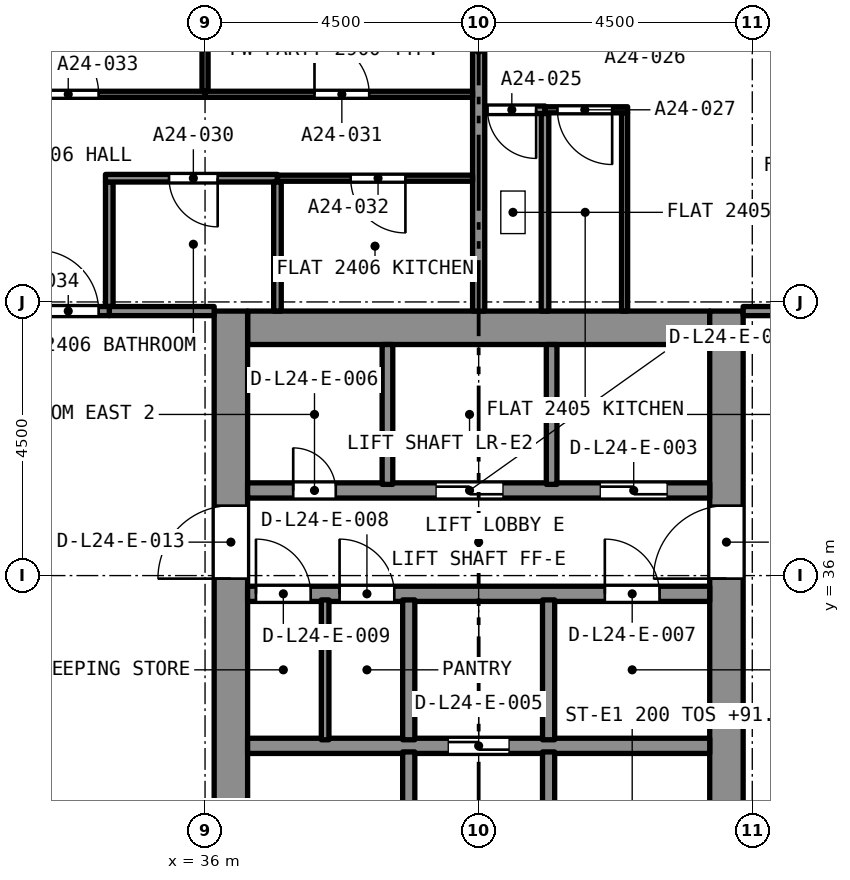
"""IFC4 building model, lengths in metres.
Left out: names, types, materials, properties, quantities, classifications, styles, units other than length and angle.
Written with IfcOpenShell. Run it as: python <this file> out.ifc"""

import sys

from ifc_helpers import new_model, si_unit, direction, frame, frame_2d, origin, place, context, subcontext, project, spatial, rectangle, extrude, element, fill, save


model = new_model("IFC4")
c1 = context("Model", 3, precision=1e-05, world=origin(), true_north=direction((0.0, 1.0)))
c2 = subcontext(c1, "Body", "Model", "MODEL_VIEW")
j1 = project(units=[si_unit("LENGTHUNIT", "METRE"), si_unit("PLANEANGLEUNIT", "RADIAN")], contexts=[c1])
p1 = place(None, origin())
s1 = spatial("IfcSite", under=j1, at=p1, CompositionType="ELEMENT")
p2 = place(p1, origin())
s2 = spatial("IfcBuilding", under=s1, at=p2, CompositionType="ELEMENT")
p3 = place(p2, frame((0.0, 0.0, 89.6)))
s3 = spatial("IfcBuildingStorey", under=s2, at=p3, CompositionType="ELEMENT", Elevation=89.6)
p4 = place(p3, frame((36.7, 40.075, 0.0), z_axis=(0.0, 0.0, 1.0), x_axis=(1.0, 0.0, 0.0)))
e1 = element("IfcWall", 1, at=p4, inside=s3, PredefinedType="SOLIDWALL", context=c2, shape_type="SweptSolid", body=[
    extrude(rectangle(XDim=7.6, YDim=0.55, at=frame_2d((3.8, 0.0))), origin(), (0.0, 0.0, 1.0), 3.2),
])
p5 = place(p3, frame((36.425, 27.15, 0.0), z_axis=(0.0, 0.0, 1.0), x_axis=(0.0, 1.0, 0.0)))
e2 = element("IfcWall", 2, at=p5, inside=s3, PredefinedType="SOLIDWALL", context=c2, shape_type="SweptSolid", body=[
    extrude(rectangle(XDim=13.2, YDim=0.55, at=frame_2d((6.6, 0.0))), origin(), (0.0, 0.0, 1.0), 3.2),
])
p6 = place(p5, frame((8.8, 0.0, 0.0)))
e3 = element("IfcOpeningElement", 3, at=p6, cuts=e2, PredefinedType="OPENING", context=c2, shape_type="SweptSolid", body=[
    extrude(rectangle(XDim=1.2, YDim=2.1, at=frame_2d((0.6, 1.05))), frame((0.0, 0.285, 0.0), z_axis=(0.0, -1.0, 0.0), x_axis=(1.0, 0.0, 0.0)), (0.0, 0.0, 1.0), 0.57),
])
p7 = place(p3, frame((44.575, 27.15, 0.0), z_axis=(0.0, 0.0, 1.0), x_axis=(0.0, 1.0, 0.0)))
e4 = element("IfcWall", 4, at=p7, inside=s3, PredefinedType="SOLIDWALL", context=c2, shape_type="SweptSolid", body=[
    extrude(rectangle(XDim=13.2, YDim=0.55, at=frame_2d((6.6, 0.0))), origin(), (0.0, 0.0, 1.0), 3.2),
])
p8 = place(p7, frame((8.8, 0.0, 0.0)))
e5 = element("IfcOpeningElement", 5, at=p8, cuts=e4, PredefinedType="OPENING", context=c2, shape_type="SweptSolid", body=[
    extrude(rectangle(XDim=1.2, YDim=2.1, at=frame_2d((0.6, 1.05))), frame((0.0, 0.285, 0.0), z_axis=(0.0, -1.0, 0.0), x_axis=(1.0, 0.0, 0.0)), (0.0, 0.0, 1.0), 0.57),
])
p9 = place(p3, frame((41.591, 43.66, 0.0), z_axis=(0.0, 0.0, 1.0), x_axis=(-1.0, 0.0, 0.0)))
e6 = element("IfcWall", 6, at=p9, inside=s3, PredefinedType="PARTITIONING", context=c2, shape_type="SweptSolid", body=[
    extrude(rectangle(XDim=0.991, YDim=0.125, at=frame_2d((0.495, 0.0))), origin(), (0.0, 0.0, 1.0), 2.9),
])
p10 = place(p9, frame((0.146, 0.0, 0.0)))
e7 = element("IfcOpeningElement", 7, at=p10, cuts=e6, PredefinedType="OPENING", context=c2, shape_type="SweptSolid", body=[
    extrude(rectangle(XDim=0.8, YDim=2.1, at=frame_2d((0.4, 1.05))), frame((0.0, 0.073, 0.0), z_axis=(0.0, -1.0, 0.0), x_axis=(1.0, 0.0, 0.0)), (0.0, 0.0, 1.0), 0.145),
])
p11 = place(p3, frame((41.591, 40.35, 0.0), z_axis=(0.0, 0.0, 1.0), x_axis=(0.0, 1.0, 0.0)))
e8 = element("IfcWall", 8, at=p11, inside=s3, PredefinedType="PARTITIONING", context=c2, shape_type="SweptSolid", body=[
    extrude(rectangle(XDim=3.247, YDim=0.125, at=frame_2d((1.624, 0.0))), origin(), (0.0, 0.0, 1.0), 2.9),
])
p12 = place(p3, frame((40.5, 40.35, 0.0), z_axis=(0.0, 0.0, 1.0), x_axis=(0.0, 1.0, 0.0)))
e9 = element("IfcWall", 9, at=p12, inside=s3, PredefinedType="PARTITIONING", context=c2, shape_type="SweptSolid", body=[
    extrude(rectangle(XDim=8.575, YDim=0.2, at=frame_2d((4.288, 0.0))), origin(), (0.0, 0.0, 1.0), 2.9),
])
p13 = place(p3, frame((42.9, 40.35, 0.0), z_axis=(0.0, 0.0, 1.0), x_axis=(0.0, 1.0, 0.0)))
e10 = element("IfcWall", 10, at=p13, inside=s3, PredefinedType="PARTITIONING", context=c2, shape_type="SweptSolid", body=[
    extrude(rectangle(XDim=3.26, YDim=0.1, at=frame_2d((1.63, 0.0))), origin(), (0.0, 0.0, 1.0), 2.9),
])
p14 = place(p3, frame((42.95, 43.66, 0.0), z_axis=(0.0, 0.0, 1.0), x_axis=(-1.0, 0.0, 0.0)))
e11 = element("IfcWall", 11, at=p14, inside=s3, PredefinedType="PARTITIONING", context=c2, shape_type="SweptSolid", body=[
    extrude(rectangle(XDim=1.359, YDim=0.1, at=frame_2d((0.68, 0.0))), origin(), (0.0, 0.0, 1.0), 2.9),
])
p15 = place(p14, frame((0.254, 0.0, 0.0)))
e12 = element("IfcOpeningElement", 12, at=p15, cuts=e11, PredefinedType="OPENING", context=c2, shape_type="SweptSolid", body=[
    extrude(rectangle(XDim=0.9, YDim=2.1, at=frame_2d((0.45, 1.05))), frame((0.0, 0.06, 0.0), z_axis=(0.0, -1.0, 0.0), x_axis=(1.0, 0.0, 0.0)), (0.0, 0.0, 1.0), 0.12),
])
p16 = place(p3, frame((44.85, 40.35, 0.0), z_axis=(0.0, 0.0, 1.0), x_axis=(1.0, 0.0, 0.0)))
e13 = element("IfcWall", 13, at=p16, inside=s3, PredefinedType="PARTITIONING", context=c2, shape_type="SweptSolid", body=[
    extrude(rectangle(XDim=4.075, YDim=0.15, at=frame_2d((2.038, 0.0))), origin(), (0.0, 0.0, 1.0), 2.9),
])
p17 = place(p16, frame((1.9, 0.0, 0.0)))
e14 = element("IfcOpeningElement", 14, at=p17, cuts=e13, PredefinedType="OPENING", context=c2, shape_type="SweptSolid", body=[
    extrude(rectangle(XDim=1.0, YDim=2.1, at=frame_2d((0.5, 1.05))), frame((0.0, 0.085, 0.0), z_axis=(0.0, -1.0, 0.0), x_axis=(1.0, 0.0, 0.0)), (0.0, 0.0, 1.0), 0.17),
])
p18 = place(p3, frame((34.425, 40.425, 0.0), z_axis=(0.0, 0.0, 1.0), x_axis=(0.0, 1.0, 0.0)))
e15 = element("IfcWall", 15, at=p18, inside=s3, PredefinedType="PARTITIONING", context=c2, shape_type="SweptSolid", body=[
    extrude(rectangle(XDim=2.047, YDim=0.125, at=frame_2d((1.024, 0.0))), origin(), (0.0, 0.0, 1.0), 2.9),
])
p19 = place(p3, frame((37.19, 42.535, 0.0), z_axis=(0.0, 0.0, 1.0), x_axis=(-1.0, 0.0, 0.0)))
e16 = element("IfcWall", 16, at=p19, inside=s3, PredefinedType="PARTITIONING", context=c2, shape_type="SweptSolid", body=[
    extrude(rectangle(XDim=2.828, YDim=0.125, at=frame_2d((1.414, 0.0))), origin(), (0.0, 0.0, 1.0), 2.9),
])
p20 = place(p19, frame((0.983, 0.0, 0.0)))
e17 = element("IfcOpeningElement", 17, at=p20, cuts=e16, PredefinedType="OPENING", context=c2, shape_type="SweptSolid", body=[
    extrude(rectangle(XDim=0.8, YDim=2.1, at=frame_2d((0.4, 1.05))), frame((0.0, 0.073, 0.0), z_axis=(0.0, -1.0, 0.0), x_axis=(1.0, 0.0, 0.0)), (0.0, 0.0, 1.0), 0.145),
])
p21 = place(p3, frame((37.191, 40.35, 0.0), z_axis=(0.0, 0.0, 1.0), x_axis=(0.0, 1.0, 0.0)))
e18 = element("IfcWall", 18, at=p21, inside=s3, PredefinedType="PARTITIONING", context=c2, shape_type="SweptSolid", body=[
    extrude(rectangle(XDim=2.122, YDim=0.125, at=frame_2d((1.061, 0.0))), origin(), (0.0, 0.0, 1.0), 2.9),
])
p22 = place(p3, frame((34.425, 40.35, 0.0), z_axis=(0.0, 0.0, 1.0), x_axis=(1.0, 0.0, 0.0)))
e19 = element("IfcWall", 19, at=p22, inside=s3, PredefinedType="PARTITIONING", context=c2, shape_type="SweptSolid", body=[
    extrude(rectangle(XDim=1.725, YDim=0.15, at=frame_2d((0.862, 0.0))), origin(), (0.0, 0.0, 1.0), 2.9),
])
p23 = place(p3, frame((36.0, 43.915, 0.0), z_axis=(0.0, 0.0, 1.0), x_axis=(1.0, 0.0, 0.0)))
e20 = element("IfcWall", 20, at=p23, inside=s3, PredefinedType="PARTITIONING", context=c2, shape_type="SweptSolid", body=[
    extrude(rectangle(XDim=4.4, YDim=0.1, at=frame_2d((2.2, 0.0))), origin(), (0.0, 0.0, 1.0), 2.9),
])
p24 = place(p23, frame((1.8, 0.0, 0.0)))
e21 = element("IfcOpeningElement", 21, at=p24, cuts=e20, PredefinedType="OPENING", context=c2, shape_type="SweptSolid", body=[
    extrude(rectangle(XDim=0.9, YDim=2.1, at=frame_2d((0.45, 1.05))), frame((0.0, 0.06, 0.0), z_axis=(0.0, -1.0, 0.0), x_axis=(1.0, 0.0, 0.0)), (0.0, 0.0, 1.0), 0.12),
])
p25 = place(p3, frame((36.0, 43.965, 0.0), z_axis=(0.0, 0.0, 1.0), x_axis=(0.0, 1.0, 0.0)))
e22 = element("IfcWall", 22, at=p25, inside=s3, PredefinedType="PARTITIONING", context=c2, shape_type="SweptSolid", body=[
    extrude(rectangle(XDim=4.96, YDim=0.1, at=frame_2d((2.48, 0.0))), origin(), (0.0, 0.0, 1.0), 2.9),
])
p26 = place(p3, frame((40.4, 42.535, 0.0), z_axis=(0.0, 0.0, 1.0), x_axis=(-1.0, 0.0, 0.0)))
e23 = element("IfcWall", 23, at=p26, inside=s3, PredefinedType="PARTITIONING", context=c2, shape_type="SweptSolid", body=[
    extrude(rectangle(XDim=3.209, YDim=0.1, at=frame_2d((1.605, 0.0))), origin(), (0.0, 0.0, 1.0), 2.9),
])
p27 = place(p26, frame((1.105, 0.0, 0.0)))
e24 = element("IfcOpeningElement", 24, at=p27, cuts=e23, PredefinedType="OPENING", context=c2, shape_type="SweptSolid", body=[
    extrude(rectangle(XDim=0.9, YDim=2.1, at=frame_2d((0.45, 1.05))), frame((0.0, 0.06, 0.0), z_axis=(0.0, -1.0, 0.0), x_axis=(1.0, 0.0, 0.0)), (0.0, 0.0, 1.0), 0.12),
])
p28 = place(p3, frame((31.6, 43.915, 0.0), z_axis=(0.0, 0.0, 1.0), x_axis=(1.0, 0.0, 0.0)))
e25 = element("IfcWall", 25, at=p28, inside=s3, PredefinedType="PARTITIONING", context=c2, shape_type="SweptSolid", body=[
    extrude(rectangle(XDim=4.4, YDim=0.1, at=frame_2d((2.2, 0.0))), origin(), (0.0, 0.0, 1.0), 2.9),
])
p29 = place(p28, frame((1.65, 0.0, 0.0)))
e26 = element("IfcOpeningElement", 26, at=p29, cuts=e25, PredefinedType="OPENING", context=c2, shape_type="SweptSolid", body=[
    extrude(rectangle(XDim=1.0, YDim=2.1, at=frame_2d((0.5, 1.05))), frame((0.0, 0.06, 0.0), z_axis=(0.0, -1.0, 0.0), x_axis=(1.0, 0.0, 0.0)), (0.0, 0.0, 1.0), 0.12),
])
p30 = place(p3, frame((32.075, 40.35, 0.0), z_axis=(0.0, 0.0, 1.0), x_axis=(1.0, 0.0, 0.0)))
e27 = element("IfcWall", 27, at=p30, inside=s3, PredefinedType="PARTITIONING", context=c2, shape_type="SweptSolid", body=[
    extrude(rectangle(XDim=2.35, YDim=0.15, at=frame_2d((1.175, 0.0))), origin(), (0.0, 0.0, 1.0), 2.9),
])
p31 = place(p30, frame((1.175, 0.0, 0.0)))
e28 = element("IfcOpeningElement", 28, at=p31, cuts=e27, PredefinedType="OPENING", context=c2, shape_type="SweptSolid", body=[
    extrude(rectangle(XDim=1.0, YDim=2.1, at=frame_2d((0.5, 1.05))), frame((0.0, 0.085, 0.0), z_axis=(0.0, -1.0, 0.0), x_axis=(1.0, 0.0, 0.0)), (0.0, 0.0, 1.0), 0.17),
])
p32 = place(p3, frame((36.7, 33.2, 0.0), z_axis=(0.0, 0.0, 1.0), x_axis=(1.0, 0.0, 0.0)))
e29 = element("IfcWall", 29, at=p32, inside=s3, PredefinedType="SOLIDWALL", context=c2, shape_type="SweptSolid", body=[
    extrude(rectangle(XDim=7.6, YDim=0.25, at=frame_2d((3.8, 0.0))), origin(), (0.0, 0.0, 1.0), 2.9),
])
p33 = place(p32, frame((3.3, 0.0, 0.0)))
e30 = element("IfcOpeningElement", 30, at=p33, cuts=e29, PredefinedType="OPENING", context=c2, shape_type="SweptSolid", body=[
    extrude(rectangle(XDim=1.0, YDim=2.1, at=frame_2d((0.5, 1.05))), frame((0.0, 0.135, 0.0), z_axis=(0.0, -1.0, 0.0), x_axis=(1.0, 0.0, 0.0)), (0.0, 0.0, 1.0), 0.27),
])
p34 = place(p3, frame((36.7, 35.7, 0.0), z_axis=(0.0, 0.0, 1.0), x_axis=(1.0, 0.0, 0.0)))
e31 = element("IfcWall", 31, at=p34, inside=s3, PredefinedType="SOLIDWALL", context=c2, shape_type="SweptSolid", body=[
    extrude(rectangle(XDim=7.6, YDim=0.25, at=frame_2d((3.8, 0.0))), origin(), (0.0, 0.0, 1.0), 2.9),
])
p35 = place(p34, frame((5.875, 0.0, 0.0)))
e32 = element("IfcOpeningElement", 32, at=p35, cuts=e31, PredefinedType="OPENING", context=c2, shape_type="SweptSolid", body=[
    extrude(rectangle(XDim=0.9, YDim=2.1, at=frame_2d((0.45, 1.05))), frame((0.0, 0.135, 0.0), z_axis=(0.0, -1.0, 0.0), x_axis=(1.0, 0.0, 0.0)), (0.0, 0.0, 1.0), 0.27),
])
p36 = place(p34, frame((1.512, 0.0, 0.0)))
e33 = element("IfcOpeningElement", 33, at=p36, cuts=e31, PredefinedType="OPENING", context=c2, shape_type="SweptSolid", body=[
    extrude(rectangle(XDim=0.9, YDim=2.1, at=frame_2d((0.45, 1.05))), frame((0.0, 0.135, 0.0), z_axis=(0.0, -1.0, 0.0), x_axis=(1.0, 0.0, 0.0)), (0.0, 0.0, 1.0), 0.27),
])
p37 = place(p34, frame((0.137, 0.0, 0.0)))
e34 = element("IfcOpeningElement", 34, at=p37, cuts=e31, PredefinedType="OPENING", context=c2, shape_type="SweptSolid", body=[
    extrude(rectangle(XDim=0.9, YDim=2.1, at=frame_2d((0.45, 1.05))), frame((0.0, 0.135, 0.0), z_axis=(0.0, -1.0, 0.0), x_axis=(1.0, 0.0, 0.0)), (0.0, 0.0, 1.0), 0.27),
])
p38 = place(p3, frame((36.7, 37.4, 0.0), z_axis=(0.0, 0.0, 1.0), x_axis=(1.0, 0.0, 0.0)))
e35 = element("IfcWall", 35, at=p38, inside=s3, PredefinedType="SOLIDWALL", context=c2, shape_type="SweptSolid", body=[
    extrude(rectangle(XDim=7.6, YDim=0.25, at=frame_2d((3.8, 0.0))), origin(), (0.0, 0.0, 1.0), 2.9),
])
p39 = place(p38, frame((5.8, 0.0, 0.0)))
e36 = element("IfcOpeningElement", 36, at=p39, cuts=e35, PredefinedType="OPENING", context=c2, shape_type="SweptSolid", body=[
    extrude(rectangle(XDim=1.1, YDim=2.4, at=frame_2d((0.55, 1.2))), frame((0.0, 0.135, 0.0), z_axis=(0.0, -1.0, 0.0), x_axis=(1.0, 0.0, 0.0)), (0.0, 0.0, 1.0), 0.27),
])
p40 = place(p38, frame((3.1, 0.0, 0.0)))
e37 = element("IfcOpeningElement", 37, at=p40, cuts=e35, PredefinedType="OPENING", context=c2, shape_type="SweptSolid", body=[
    extrude(rectangle(XDim=1.1, YDim=2.4, at=frame_2d((0.55, 1.2))), frame((0.0, 0.135, 0.0), z_axis=(0.0, -1.0, 0.0), x_axis=(1.0, 0.0, 0.0)), (0.0, 0.0, 1.0), 0.27),
])
p41 = place(p38, frame((0.75, 0.0, 0.0)))
e38 = element("IfcOpeningElement", 38, at=p41, cuts=e35, PredefinedType="OPENING", context=c2, shape_type="SweptSolid", body=[
    extrude(rectangle(XDim=0.7, YDim=2.1, at=frame_2d((0.35, 1.05))), frame((0.0, 0.135, 0.0), z_axis=(0.0, -1.0, 0.0), x_axis=(1.0, 0.0, 0.0)), (0.0, 0.0, 1.0), 0.27),
])
p42 = place(p3, frame((41.65, 27.7, 0.0), z_axis=(0.0, 0.0, 1.0), x_axis=(0.0, 1.0, 0.0)))
e39 = element("IfcWall", 39, at=p42, inside=s3, PredefinedType="SOLIDWALL", context=c2, shape_type="SweptSolid", body=[
    extrude(rectangle(XDim=5.4, YDim=0.2, at=frame_2d((2.7, 0.0))), origin(), (0.0, 0.0, 1.0), 2.9),
])
p43 = place(p42, frame((0.2, 0.0, 0.0)))
e40 = element("IfcOpeningElement", 40, at=p43, cuts=e39, PredefinedType="OPENING", context=c2, shape_type="SweptSolid", body=[
    extrude(rectangle(XDim=0.9, YDim=2.1, at=frame_2d((0.45, 1.05))), frame((0.0, 0.11, 0.0), z_axis=(0.0, -1.0, 0.0), x_axis=(1.0, 0.0, 0.0)), (0.0, 0.0, 1.0), 0.22),
])
p44 = place(p3, frame((39.35, 27.7, 0.0), z_axis=(0.0, 0.0, 1.0), x_axis=(0.0, 1.0, 0.0)))
e41 = element("IfcWall", 41, at=p44, inside=s3, PredefinedType="SOLIDWALL", context=c2, shape_type="SweptSolid", body=[
    extrude(rectangle(XDim=5.4, YDim=0.2, at=frame_2d((2.7, 0.0))), origin(), (0.0, 0.0, 1.0), 2.9),
])
p45 = place(p44, frame((0.2, 0.0, 0.0)))
e42 = element("IfcOpeningElement", 42, at=p45, cuts=e41, PredefinedType="OPENING", context=c2, shape_type="SweptSolid", body=[
    extrude(rectangle(XDim=0.9, YDim=2.1, at=frame_2d((0.45, 1.05))), frame((0.0, 0.11, 0.0), z_axis=(0.0, -1.0, 0.0), x_axis=(1.0, 0.0, 0.0)), (0.0, 0.0, 1.0), 0.22),
])
for number, where, z_axis, x_axis in (
    (43, (41.65, 33.3, 0.0), (0.0, 0.0, 1.0), (0.0, 1.0, 0.0)),
    (44, (39.35, 33.3, 0.0), (0.0, 0.0, 1.0), (0.0, 1.0, 0.0)),
):
    element("IfcWall", number, at=place(p3, frame(where, z_axis=z_axis, x_axis=x_axis)), inside=s3, PredefinedType="SOLIDWALL", context=c2, shape_type="SweptSolid", body=[
        extrude(rectangle(XDim=2.3, YDim=0.2, at=frame_2d((1.15, 0.0))), origin(), (0.0, 0.0, 1.0), 2.9),
    ])
for number, where, z_axis, x_axis in (
    (45, (41.7, 37.5, 0.0), (0.0, 0.0, 1.0), (0.0, 1.0, 0.0)),
    (46, (39.0, 37.5, 0.0), (0.0, 0.0, 1.0), (0.0, 1.0, 0.0)),
):
    element("IfcWall", number, at=place(p3, frame(where, z_axis=z_axis, x_axis=x_axis)), inside=s3, PredefinedType="SOLIDWALL", context=c2, shape_type="SweptSolid", body=[
        extrude(rectangle(XDim=2.3, YDim=0.175, at=frame_2d((1.15, 0.0))), origin(), (0.0, 0.0, 1.0), 2.9),
    ])
p46 = place(p3, frame((37.975, 33.3, 0.0), z_axis=(0.0, 0.0, 1.0), x_axis=(0.0, 1.0, 0.0)))
e47 = element("IfcWall", 47, at=p46, inside=s3, PredefinedType="PARTITIONING", context=c2, shape_type="SweptSolid", body=[
    extrude(rectangle(XDim=2.3, YDim=0.125, at=frame_2d((1.15, 0.0))), origin(), (0.0, 0.0, 1.0), 2.9),
])
p47 = place(p10, origin())
e48 = element("IfcDoor", 48, at=p47, inside=s3, OperationType="SINGLE_SWING_RIGHT", PredefinedType="DOOR", context=c2, shape_type="SweptSolid", body=[
    extrude(rectangle(XDim=0.8, YDim=2.1, at=frame_2d((0.4, 1.05))), frame((0.0, 0.025, 0.0), z_axis=(0.0, -1.0, 0.0), x_axis=(1.0, 0.0, 0.0)), (0.0, 0.0, 1.0), 0.05),
])
fill(e7, e48)
p48 = place(p15, origin())
e49 = element("IfcDoor", 49, at=p48, inside=s3, OperationType="SINGLE_SWING_RIGHT", PredefinedType="DOOR", context=c2, shape_type="SweptSolid", body=[
    extrude(rectangle(XDim=0.9, YDim=2.1, at=frame_2d((0.45, 1.05))), frame((0.0, 0.025, 0.0), z_axis=(0.0, -1.0, 0.0), x_axis=(1.0, 0.0, 0.0)), (0.0, 0.0, 1.0), 0.05),
])
fill(e12, e49)
p49 = place(p20, origin())
e50 = element("IfcDoor", 50, at=p49, inside=s3, OperationType="SINGLE_SWING_LEFT", PredefinedType="DOOR", context=c2, shape_type="SweptSolid", body=[
    extrude(rectangle(XDim=0.8, YDim=2.1, at=frame_2d((0.4, 1.05))), frame((0.0, 0.025, 0.0), z_axis=(0.0, -1.0, 0.0), x_axis=(1.0, 0.0, 0.0)), (0.0, 0.0, 1.0), 0.05),
])
fill(e17, e50)
p50 = place(p24, origin())
e51 = element("IfcDoor", 51, at=p50, inside=s3, OperationType="SINGLE_SWING_RIGHT", PredefinedType="DOOR", context=c2, shape_type="SweptSolid", body=[
    extrude(rectangle(XDim=0.9, YDim=2.1, at=frame_2d((0.45, 1.05))), frame((0.0, 0.025, 0.0), z_axis=(0.0, -1.0, 0.0), x_axis=(1.0, 0.0, 0.0)), (0.0, 0.0, 1.0), 0.05),
])
fill(e21, e51)
p51 = place(p27, origin())
e52 = element("IfcDoor", 52, at=p51, inside=s3, OperationType="SINGLE_SWING_LEFT", PredefinedType="DOOR", context=c2, shape_type="SweptSolid", body=[
    extrude(rectangle(XDim=0.9, YDim=2.1, at=frame_2d((0.45, 1.05))), frame((0.0, 0.025, 0.0), z_axis=(0.0, -1.0, 0.0), x_axis=(1.0, 0.0, 0.0)), (0.0, 0.0, 1.0), 0.05),
])
fill(e24, e52)
p52 = place(p29, origin())
e53 = element("IfcDoor", 53, at=p52, inside=s3, OperationType="SINGLE_SWING_LEFT", PredefinedType="DOOR", context=c2, shape_type="SweptSolid", body=[
    extrude(rectangle(XDim=1.0, YDim=2.1, at=frame_2d((0.5, 1.05))), frame((0.0, 0.025, 0.0), z_axis=(0.0, -1.0, 0.0), x_axis=(1.0, 0.0, 0.0)), (0.0, 0.0, 1.0), 0.05),
])
fill(e26, e53)
p53 = place(p31, origin())
e54 = element("IfcDoor", 54, at=p53, inside=s3, OperationType="SINGLE_SWING_RIGHT", PredefinedType="DOOR", context=c2, shape_type="SweptSolid", body=[
    extrude(rectangle(XDim=1.0, YDim=2.1, at=frame_2d((0.5, 1.05))), frame((0.0, 0.025, 0.0), z_axis=(0.0, -1.0, 0.0), x_axis=(1.0, 0.0, 0.0)), (0.0, 0.0, 1.0), 0.05),
])
fill(e28, e54)
p54 = place(p39, origin())
e55 = element("IfcDoor", 55, at=p54, inside=s3, OperationType="SLIDING_TO_LEFT", PredefinedType="DOOR", context=c2, shape_type="SweptSolid", body=[
    extrude(rectangle(XDim=1.1, YDim=2.4, at=frame_2d((0.55, 1.2))), frame((0.0, 0.025, 0.0), z_axis=(0.0, -1.0, 0.0), x_axis=(1.0, 0.0, 0.0)), (0.0, 0.0, 1.0), 0.05),
])
fill(e36, e55)
p55 = place(p40, origin())
e56 = element("IfcDoor", 56, at=p55, inside=s3, OperationType="SLIDING_TO_LEFT", PredefinedType="DOOR", context=c2, shape_type="SweptSolid", body=[
    extrude(rectangle(XDim=1.1, YDim=2.4, at=frame_2d((0.55, 1.2))), frame((0.0, 0.025, 0.0), z_axis=(0.0, -1.0, 0.0), x_axis=(1.0, 0.0, 0.0)), (0.0, 0.0, 1.0), 0.05),
])
fill(e37, e56)
p56 = place(p33, origin())
e57 = element("IfcDoor", 57, at=p56, inside=s3, OperationType="SLIDING_TO_LEFT", PredefinedType="DOOR", context=c2, shape_type="SweptSolid", body=[
    extrude(rectangle(XDim=1.0, YDim=2.1, at=frame_2d((0.5, 1.05))), frame((0.0, 0.025, 0.0), z_axis=(0.0, -1.0, 0.0), x_axis=(1.0, 0.0, 0.0)), (0.0, 0.0, 1.0), 0.05),
])
fill(e30, e57)
p57 = place(p41, origin())
e58 = element("IfcDoor", 58, at=p57, inside=s3, OperationType="SINGLE_SWING_LEFT", PredefinedType="DOOR", context=c2, shape_type="SweptSolid", body=[
    extrude(rectangle(XDim=0.7, YDim=2.1, at=frame_2d((0.35, 1.05))), frame((0.0, 0.025, 0.0), z_axis=(0.0, -1.0, 0.0), x_axis=(1.0, 0.0, 0.0)), (0.0, 0.0, 1.0), 0.05),
])
fill(e38, e58)
p58 = place(p35, origin())
e59 = element("IfcDoor", 59, at=p58, inside=s3, OperationType="SINGLE_SWING_LEFT", PredefinedType="DOOR", context=c2, shape_type="SweptSolid", body=[
    extrude(rectangle(XDim=0.9, YDim=2.1, at=frame_2d((0.45, 1.05))), frame((0.0, 0.025, 0.0), z_axis=(0.0, -1.0, 0.0), x_axis=(1.0, 0.0, 0.0)), (0.0, 0.0, 1.0), 0.05),
])
fill(e32, e59)
p59 = place(p36, origin())
e60 = element("IfcDoor", 60, at=p59, inside=s3, OperationType="SINGLE_SWING_LEFT", PredefinedType="DOOR", context=c2, shape_type="SweptSolid", body=[
    extrude(rectangle(XDim=0.9, YDim=2.1, at=frame_2d((0.45, 1.05))), frame((0.0, 0.025, 0.0), z_axis=(0.0, -1.0, 0.0), x_axis=(1.0, 0.0, 0.0)), (0.0, 0.0, 1.0), 0.05),
])
fill(e33, e60)
p60 = place(p37, origin())
e61 = element("IfcDoor", 61, at=p60, inside=s3, OperationType="SINGLE_SWING_LEFT", PredefinedType="DOOR", context=c2, shape_type="SweptSolid", body=[
    extrude(rectangle(XDim=0.9, YDim=2.1, at=frame_2d((0.45, 1.05))), frame((0.0, 0.025, 0.0), z_axis=(0.0, -1.0, 0.0), x_axis=(1.0, 0.0, 0.0)), (0.0, 0.0, 1.0), 0.05),
])
fill(e34, e61)
p61 = place(p6, origin())
e62 = element("IfcDoor", 62, at=p61, inside=s3, OperationType="SINGLE_SWING_LEFT", PredefinedType="DOOR", context=c2, shape_type="SweptSolid", body=[
    extrude(rectangle(XDim=1.2, YDim=2.1, at=frame_2d((0.6, 1.05))), frame((0.0, 0.025, 0.0), z_axis=(0.0, -1.0, 0.0), x_axis=(1.0, 0.0, 0.0)), (0.0, 0.0, 1.0), 0.05),
])
fill(e3, e62)
p62 = place(p8, origin())
e63 = element("IfcDoor", 63, at=p62, inside=s3, OperationType="SINGLE_SWING_LEFT", PredefinedType="DOOR", context=c2, shape_type="SweptSolid", body=[
    extrude(rectangle(XDim=1.2, YDim=2.1, at=frame_2d((0.6, 1.05))), frame((0.0, 0.025, 0.0), z_axis=(0.0, -1.0, 0.0), x_axis=(1.0, 0.0, 0.0)), (0.0, 0.0, 1.0), 0.05),
])
fill(e5, e63)
save(model, sys.argv[1])
